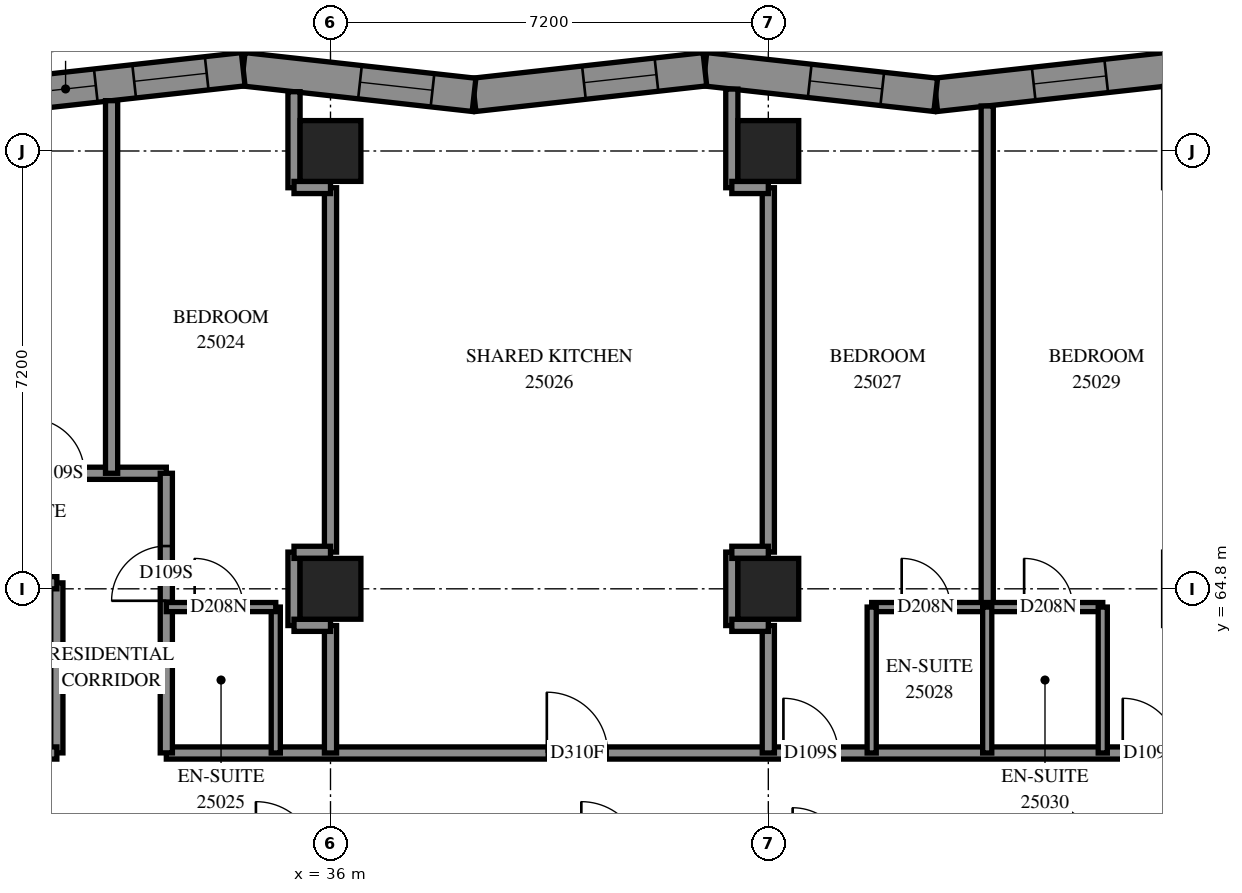
"""IFC4 building model, lengths in metres.
Left out: names, types, materials, properties, quantities, classifications, styles, units other than length and angle.
Written with IfcOpenShell. Run it as: python <this file> out.ifc"""

import sys

from ifc_helpers import new_model, si_unit, direction, frame, frame_2d, origin, origin_2d, place, context, subcontext, project, spatial, polyline, rectangle, outline, extrude, element, fill, save


model = new_model("IFC4")
c1 = context("Model", 3, precision=1e-05, world=origin(), true_north=direction((0.0, 1.0)))
c2 = subcontext(c1, "Body", "Model", "MODEL_VIEW")
j1 = project(units=[si_unit("LENGTHUNIT", "METRE"), si_unit("PLANEANGLEUNIT", "RADIAN")], contexts=[c1])
p1 = place(None, origin())
s1 = spatial("IfcSite", under=j1, at=p1, CompositionType="ELEMENT")
p2 = place(p1, origin())
s2 = spatial("IfcBuilding", under=s1, at=p2, CompositionType="ELEMENT")
p3 = place(p2, frame((0.0, 0.0, 94.8)))
s3 = spatial("IfcBuildingStorey", under=s2, at=p3, CompositionType="ELEMENT", Elevation=94.8)
for number, where, z_axis, x_axis in (
    (1, (36.0, 64.8, 0.0), (0.0, 0.0, 1.0), (1.0, 0.0, 0.0)),
    (2, (36.0, 72.0, 0.0), (0.0, 0.0, 1.0), (1.0, 0.0, 0.0)),
    (3, (43.2, 64.8, 0.0), (0.0, 0.0, 1.0), (1.0, 0.0, 0.0)),
    (4, (43.2, 72.0, 0.0), (0.0, 0.0, 1.0), (1.0, 0.0, 0.0)),
):
    element("IfcColumn", number, at=place(p3, frame(where, z_axis=z_axis, x_axis=x_axis)), inside=s3, PredefinedType="COLUMN", context=c2, shape_type="SweptSolid", body=[
        extrude(rectangle(XDim=1.0, YDim=1.0, at=origin_2d()), origin(), (0.0, 0.0, 1.0), 3.1),
    ])
p4 = place(p3, frame((49.749, 73.344, 0.0), z_axis=(0.0, 0.0, 1.0), x_axis=(-0.99390702, -0.1102217568, 0.0)))
e5 = element("IfcWall", 5, at=p4, inside=s3, PredefinedType="SOLIDWALL", context=c2, shape_type="SweptSolid", body=[
    extrude(outline(polyline([(-0.03, -0.275), (3.789, -0.275), (3.85, 0.275), (0.03, 0.275), (-0.03, -0.275)])), origin(), (0.0, 0.0, 1.0), 3.1),
])
p5 = place(p4, frame((0.999, 0.0, 0.5)))
e6 = element("IfcOpeningElement", 6, at=p5, cuts=e5, PredefinedType="OPENING", context=c2, shape_type="SweptSolid", body=[
    extrude(rectangle(XDim=1.2, YDim=2.45, at=frame_2d((0.6, 1.225))), frame((0.0, 0.285, 0.0), z_axis=(0.0, -1.0, 0.0), x_axis=(1.0, 0.0, 0.0)), (0.0, 0.0, 1.0), 0.57),
])
p6 = place(p3, frame((45.953, 72.923, 0.0), z_axis=(0.0, 0.0, 1.0), x_axis=(-0.99390702, 0.1102217568, 0.0)))
e7 = element("IfcWall", 7, at=p6, inside=s3, PredefinedType="SOLIDWALL", context=c2, shape_type="SweptSolid", body=[
    extrude(outline(polyline([(0.03, -0.275), (3.85, -0.275), (3.789, 0.275), (-0.03, 0.275), (0.03, -0.275)])), origin(), (0.0, 0.0, 1.0), 3.1),
])
p7 = place(p6, frame((0.885, 0.0, 0.5)))
e8 = element("IfcOpeningElement", 8, at=p7, cuts=e7, PredefinedType="OPENING", context=c2, shape_type="SweptSolid", body=[
    extrude(rectangle(XDim=1.2, YDim=2.45, at=frame_2d((0.6, 1.225))), frame((0.0, 0.285, 0.0), z_axis=(0.0, -1.0, 0.0), x_axis=(1.0, 0.0, 0.0)), (0.0, 0.0, 1.0), 0.57),
])
p8 = place(p3, frame((42.157, 73.344, 0.0), z_axis=(0.0, 0.0, 1.0), x_axis=(-0.99390702, -0.1102217568, 0.0)))
e9 = element("IfcWall", 9, at=p8, inside=s3, PredefinedType="SOLIDWALL", context=c2, shape_type="SweptSolid", body=[
    extrude(outline(polyline([(-0.03, -0.275), (3.789, -0.275), (3.85, 0.275), (0.03, 0.275), (-0.03, -0.275)])), origin(), (0.0, 0.0, 1.0), 3.1),
])
p9 = place(p8, frame((0.801, 0.0, 0.5)))
e10 = element("IfcOpeningElement", 10, at=p9, cuts=e9, PredefinedType="OPENING", context=c2, shape_type="SweptSolid", body=[
    extrude(rectangle(XDim=1.2, YDim=2.45, at=frame_2d((0.6, 1.225))), frame((0.0, 0.285, 0.0), z_axis=(0.0, -1.0, 0.0), x_axis=(1.0, 0.0, 0.0)), (0.0, 0.0, 1.0), 0.57),
])
p10 = place(p3, frame((38.361, 72.923, 0.0), z_axis=(0.0, 0.0, 1.0), x_axis=(-0.99390702, 0.1102217568, 0.0)))
e11 = element("IfcWall", 11, at=p10, inside=s3, PredefinedType="SOLIDWALL", context=c2, shape_type="SweptSolid", body=[
    extrude(outline(polyline([(0.03, -0.275), (3.85, -0.275), (3.789, 0.275), (-0.03, 0.275), (0.03, -0.275)])), origin(), (0.0, 0.0, 1.0), 3.1),
])
p11 = place(p10, frame((0.688, 0.0, 0.5)))
e12 = element("IfcOpeningElement", 12, at=p11, cuts=e11, PredefinedType="OPENING", context=c2, shape_type="SweptSolid", body=[
    extrude(rectangle(XDim=1.2, YDim=2.45, at=frame_2d((0.6, 1.225))), frame((0.0, 0.285, 0.0), z_axis=(0.0, -1.0, 0.0), x_axis=(1.0, 0.0, 0.0)), (0.0, 0.0, 1.0), 0.57),
])
p12 = place(p3, frame((34.564, 73.344, 0.0), z_axis=(0.0, 0.0, 1.0), x_axis=(-0.993907338, -0.1102188888, 0.0)))
e13 = element("IfcWall", 13, at=p12, inside=s3, PredefinedType="SOLIDWALL", context=c2, shape_type="SweptSolid", body=[
    extrude(outline(polyline([(-0.03, -0.275), (3.789, -0.275), (3.85, 0.275), (0.03, 0.275), (-0.03, -0.275)])), origin(), (0.0, 0.0, 1.0), 3.1),
])
p13 = place(p12, frame((0.604, 0.0, 0.5)))
e14 = element("IfcOpeningElement", 14, at=p13, cuts=e13, PredefinedType="OPENING", context=c2, shape_type="SweptSolid", body=[
    extrude(rectangle(XDim=1.2, YDim=2.45, at=frame_2d((0.6, 1.225))), frame((0.0, 0.285, 0.0), z_axis=(0.0, -1.0, 0.0), x_axis=(1.0, 0.0, 0.0)), (0.0, 0.0, 1.0), 0.57),
])
p14 = place(p12, frame((2.439, 0.0, 0.45)))
e15 = element("IfcOpeningElement", 15, at=p14, cuts=e13, PredefinedType="OPENING", context=c2, shape_type="SweptSolid", body=[
    extrude(rectangle(XDim=1.0, YDim=2.5, at=frame_2d((0.5, 1.25))), frame((0.0, 0.285, 0.0), z_axis=(0.0, -1.0, 0.0), x_axis=(1.0, 0.0, 0.0)), (0.0, 0.0, 1.0), 0.57),
])
p15 = place(p3, frame((33.3, 62.1, 0.0), z_axis=(0.0, 0.0, 1.0), x_axis=(1.0, 0.0, 0.0)))
e16 = element("IfcWall", 16, at=p15, inside=s3, PredefinedType="PARTITIONING", context=c2, shape_type="SweptSolid", body=[
    extrude(rectangle(XDim=17.1, YDim=0.2, at=frame_2d((8.55, 0.0))), origin(), (0.0, 0.0, 1.0), 3.1),
])
p16 = place(p15, frame((6.258, 0.0, 0.0)))
e17 = element("IfcOpeningElement", 17, at=p16, cuts=e16, PredefinedType="OPENING", context=c2, shape_type="SweptSolid", body=[
    extrude(rectangle(XDim=1.0, YDim=2.1, at=frame_2d((0.5, 1.05))), frame((0.0, 0.11, 0.0), z_axis=(0.0, -1.0, 0.0), x_axis=(1.0, 0.0, 0.0)), (0.0, 0.0, 1.0), 0.22),
])
p17 = place(p15, frame((10.148, 0.0, 0.0)))
e18 = element("IfcOpeningElement", 18, at=p17, cuts=e16, PredefinedType="OPENING", context=c2, shape_type="SweptSolid", body=[
    extrude(rectangle(XDim=0.9, YDim=2.1, at=frame_2d((0.45, 1.05))), frame((0.0, 0.11, 0.0), z_axis=(0.0, -1.0, 0.0), x_axis=(1.0, 0.0, 0.0)), (0.0, 0.0, 1.0), 0.22),
])
p18 = place(p15, frame((15.729, 0.0, 0.0)))
e19 = element("IfcOpeningElement", 19, at=p18, cuts=e16, PredefinedType="OPENING", context=c2, shape_type="SweptSolid", body=[
    extrude(rectangle(XDim=0.9, YDim=2.1, at=frame_2d((0.45, 1.05))), frame((0.0, 0.11, 0.0), z_axis=(0.0, -1.0, 0.0), x_axis=(1.0, 0.0, 0.0)), (0.0, 0.0, 1.0), 0.22),
])
p19 = place(p3, frame((21.602, 66.7, 0.0), z_axis=(0.0, 0.0, 1.0), x_axis=(1.0, 0.0, 0.0)))
e20 = element("IfcWall", 20, at=p19, inside=s3, PredefinedType="PARTITIONING", context=c2, shape_type="SweptSolid", body=[
    extrude(rectangle(XDim=11.698, YDim=0.2, at=frame_2d((5.849, 0.0))), origin(), (0.0, 0.0, 1.0), 3.1),
])
p20 = place(p19, frame((1.79, 0.0, 0.0)))
e21 = element("IfcOpeningElement", 21, at=p20, cuts=e20, PredefinedType="OPENING", context=c2, shape_type="SweptSolid", body=[
    extrude(rectangle(XDim=1.0, YDim=2.1, at=frame_2d((0.5, 1.05))), frame((0.0, 0.11, 0.0), z_axis=(0.0, -1.0, 0.0), x_axis=(1.0, 0.0, 0.0)), (0.0, 0.0, 1.0), 0.22),
])
p21 = place(p19, frame((3.998, 0.0, 0.0)))
e22 = element("IfcOpeningElement", 22, at=p21, cuts=e20, PredefinedType="OPENING", context=c2, shape_type="SweptSolid", body=[
    extrude(rectangle(XDim=0.9, YDim=2.1, at=frame_2d((0.45, 1.05))), frame((0.0, 0.11, 0.0), z_axis=(0.0, -1.0, 0.0), x_axis=(1.0, 0.0, 0.0)), (0.0, 0.0, 1.0), 0.22),
])
p22 = place(p19, frame((9.448, 0.0, 0.0)))
e23 = element("IfcOpeningElement", 23, at=p22, cuts=e20, PredefinedType="OPENING", context=c2, shape_type="SweptSolid", body=[
    extrude(rectangle(XDim=0.9, YDim=2.1, at=frame_2d((0.45, 1.05))), frame((0.0, 0.11, 0.0), z_axis=(0.0, -1.0, 0.0), x_axis=(1.0, 0.0, 0.0)), (0.0, 0.0, 1.0), 0.22),
])
p23 = place(p3, frame((46.8, 64.5, 0.0), z_axis=(0.0, 0.0, 1.0), x_axis=(0.0, 1.0, 0.0)))
e24 = element("IfcWall", 24, at=p23, inside=s3, PredefinedType="PARTITIONING", context=c2, shape_type="SweptSolid", body=[
    extrude(rectangle(XDim=8.241, YDim=0.2, at=frame_2d((4.12, 0.0))), origin(), (0.0, 0.0, 1.0), 3.1),
])
p24 = place(p3, frame((32.4, 66.7, 0.0), z_axis=(0.0, 0.0, 1.0), x_axis=(0.0, 1.0, 0.0)))
e25 = element("IfcWall", 25, at=p24, inside=s3, PredefinedType="PARTITIONING", context=c2, shape_type="SweptSolid", body=[
    extrude(rectangle(XDim=6.128, YDim=0.2, at=frame_2d((3.064, 0.0))), origin(), (0.0, 0.0, 1.0), 3.1),
])
for number, where, z_axis, x_axis in (
    (26, (36.0, 65.404, 0.0), (0.0, 0.0, 1.0), (0.0, 1.0, 0.0)),
    (27, (43.2, 65.404, 0.0), (0.0, 0.0, 1.0), (0.0, 1.0, 0.0)),
):
    element("IfcWall", number, at=place(p3, frame(where, z_axis=z_axis, x_axis=x_axis)), inside=s3, PredefinedType="PARTITIONING", context=c2, shape_type="SweptSolid", body=[
        extrude(rectangle(XDim=5.992, YDim=0.2, at=frame_2d((2.996, 0.0))), origin(), (0.0, 0.0, 1.0), 3.1),
    ])
p25 = place(p3, frame((33.3, 62.102, 0.0), z_axis=(0.0, 0.0, 1.0), x_axis=(0.0, 1.0, 0.0)))
e28 = element("IfcWall", 28, at=p25, inside=s3, PredefinedType="PARTITIONING", context=c2, shape_type="SweptSolid", body=[
    extrude(rectangle(XDim=4.598, YDim=0.2, at=frame_2d((2.299, 0.0))), origin(), (0.0, 0.0, 1.0), 3.1),
])
p26 = place(p25, frame((2.501, 0.0, 0.0)))
e29 = element("IfcOpeningElement", 29, at=p26, cuts=e28, PredefinedType="OPENING", context=c2, shape_type="SweptSolid", body=[
    extrude(rectangle(XDim=0.9, YDim=2.1, at=frame_2d((0.45, 1.05))), frame((0.0, 0.11, 0.0), z_axis=(0.0, -1.0, 0.0), x_axis=(1.0, 0.0, 0.0)), (0.0, 0.0, 1.0), 0.22),
])
p27 = place(p3, frame((44.9, 64.5, 0.0), z_axis=(0.0, 0.0, 1.0), x_axis=(1.0, 0.0, 0.0)))
e30 = element("IfcWall", 30, at=p27, inside=s3, PredefinedType="PARTITIONING", context=c2, shape_type="SweptSolid", body=[
    extrude(rectangle(XDim=3.8, YDim=0.15, at=frame_2d((1.9, 0.0))), origin(), (0.0, 0.0, 1.0), 3.1),
])
p28 = place(p27, frame((0.493, 0.0, 0.0)))
e31 = element("IfcOpeningElement", 31, at=p28, cuts=e30, PredefinedType="OPENING", context=c2, shape_type="SweptSolid", body=[
    extrude(rectangle(XDim=0.8, YDim=2.1, at=frame_2d((0.4, 1.05))), frame((0.0, 0.085, 0.0), z_axis=(0.0, -1.0, 0.0), x_axis=(1.0, 0.0, 0.0)), (0.0, 0.0, 1.0), 0.17),
])
p29 = place(p27, frame((2.507, 0.0, 0.0)))
e32 = element("IfcOpeningElement", 32, at=p29, cuts=e30, PredefinedType="OPENING", context=c2, shape_type="SweptSolid", body=[
    extrude(rectangle(XDim=0.8, YDim=2.1, at=frame_2d((0.4, 1.05))), frame((0.0, 0.085, 0.0), z_axis=(0.0, -1.0, 0.0), x_axis=(1.0, 0.0, 0.0)), (0.0, 0.0, 1.0), 0.17),
])
p30 = place(p3, frame((31.5, 62.102, 0.0), z_axis=(0.0, 0.0, 1.0), x_axis=(0.0, 1.0, 0.0)))
e33 = element("IfcWall", 33, at=p30, inside=s3, PredefinedType="PARTITIONING", context=c2, shape_type="SweptSolid", body=[
    extrude(rectangle(XDim=2.796, YDim=0.2, at=frame_2d((1.398, 0.0))), origin(), (0.0, 0.0, 1.0), 3.1),
])
p31 = place(p3, frame((28.802, 62.1, 0.0), z_axis=(0.0, 0.0, 1.0), x_axis=(1.0, 0.0, 0.0)))
e34 = element("IfcWall", 34, at=p31, inside=s3, PredefinedType="PARTITIONING", context=c2, shape_type="SweptSolid", body=[
    extrude(rectangle(XDim=2.698, YDim=0.2, at=frame_2d((1.349, 0.0))), origin(), (0.0, 0.0, 1.0), 3.1),
])
for number, where, z_axis, x_axis in (
    (35, (35.1, 62.1, 0.0), (0.0, 0.0, 1.0), (0.0, 1.0, 0.0)),
    (36, (44.9, 62.1, 0.0), (0.0, 0.0, 1.0), (0.0, 1.0, 0.0)),
    (37, (46.8, 62.1, 0.0), (0.0, 0.0, 1.0), (0.0, 1.0, 0.0)),
    (38, (48.7, 62.1, 0.0), (0.0, 0.0, 1.0), (0.0, 1.0, 0.0)),
):
    element("IfcWall", number, at=place(p3, frame(where, z_axis=z_axis, x_axis=x_axis)), inside=s3, PredefinedType="PARTITIONING", context=c2, shape_type="SweptSolid", body=[
        extrude(rectangle(XDim=2.4, YDim=0.15, at=frame_2d((1.2, 0.0))), origin(), (0.0, 0.0, 1.0), 3.1),
    ])
p32 = place(p3, frame((29.3, 64.9, 0.0), z_axis=(0.0, 0.0, 1.0), x_axis=(1.0, 0.0, 0.0)))
e39 = element("IfcWall", 39, at=p32, inside=s3, PredefinedType="PARTITIONING", context=c2, shape_type="SweptSolid", body=[
    extrude(rectangle(XDim=2.2, YDim=0.2, at=frame_2d((1.1, 0.0))), origin(), (0.0, 0.0, 1.0), 3.1),
])
p33 = place(p32, frame((0.31, 0.0, 0.0)))
e40 = element("IfcOpeningElement", 40, at=p33, cuts=e39, PredefinedType="OPENING", context=c2, shape_type="SweptSolid", body=[
    extrude(rectangle(XDim=1.0, YDim=2.1, at=frame_2d((0.5, 1.05))), frame((0.0, 0.11, 0.0), z_axis=(0.0, -1.0, 0.0), x_axis=(1.0, 0.0, 0.0)), (0.0, 0.0, 1.0), 0.22),
])
for number, where, z_axis, x_axis in (
    (41, (36.0, 62.1, 0.0), (0.0, 0.0, 1.0), (0.0, 1.0, 0.0)),
    (42, (43.2, 62.1, 0.0), (0.0, 0.0, 1.0), (0.0, 1.0, 0.0)),
):
    element("IfcWall", number, at=place(p3, frame(where, z_axis=z_axis, x_axis=x_axis)), inside=s3, PredefinedType="PARTITIONING", context=c2, shape_type="SweptSolid", body=[
        extrude(rectangle(XDim=2.096, YDim=0.2, at=frame_2d((1.048, 0.0))), origin(), (0.0, 0.0, 1.0), 3.1),
    ])
p34 = place(p3, frame((33.3, 64.5, 0.0), z_axis=(0.0, 0.0, 1.0), x_axis=(1.0, 0.0, 0.0)))
e43 = element("IfcWall", 43, at=p34, inside=s3, PredefinedType="PARTITIONING", context=c2, shape_type="SweptSolid", body=[
    extrude(rectangle(XDim=1.8, YDim=0.15, at=frame_2d((0.9, 0.0))), origin(), (0.0, 0.0, 1.0), 3.1),
])
p35 = place(p34, frame((0.466, 0.0, 0.0)))
e44 = element("IfcOpeningElement", 44, at=p35, cuts=e43, PredefinedType="OPENING", context=c2, shape_type="SweptSolid", body=[
    extrude(rectangle(XDim=0.8, YDim=2.1, at=frame_2d((0.4, 1.05))), frame((0.0, 0.085, 0.0), z_axis=(0.0, -1.0, 0.0), x_axis=(1.0, 0.0, 0.0)), (0.0, 0.0, 1.0), 0.17),
])
p36 = place(p3, frame((42.6, 71.396, 0.0), z_axis=(0.0, 0.0, 1.0), x_axis=(0.0, 1.0, 0.0)))
e45 = element("IfcWall", 45, at=p36, inside=s3, PredefinedType="PARTITIONING", context=c2, shape_type="SweptSolid", body=[
    extrude(rectangle(XDim=1.623, YDim=0.2, at=frame_2d((0.811, 0.0))), origin(), (0.0, 0.0, 1.0), 3.1),
])
p37 = place(p3, frame((35.4, 71.396, 0.0), z_axis=(0.0, 0.0, 1.0), x_axis=(0.0, 1.0, 0.0)))
e46 = element("IfcWall", 46, at=p37, inside=s3, PredefinedType="PARTITIONING", context=c2, shape_type="SweptSolid", body=[
    extrude(rectangle(XDim=1.579, YDim=0.2, at=frame_2d((0.789, 0.0))), origin(), (0.0, 0.0, 1.0), 3.1),
])
for number, where, z_axis, x_axis in (
    (47, (35.4, 64.196, 0.0), (0.0, 0.0, 1.0), (0.0, 1.0, 0.0)),
    (48, (42.6, 64.196, 0.0), (0.0, 0.0, 1.0), (0.0, 1.0, 0.0)),
):
    element("IfcWall", number, at=place(p3, frame(where, z_axis=z_axis, x_axis=x_axis)), inside=s3, PredefinedType="PARTITIONING", context=c2, shape_type="SweptSolid", body=[
        extrude(rectangle(XDim=1.208, YDim=0.2, at=frame_2d((0.604, 0.0))), origin(), (0.0, 0.0, 1.0), 3.1),
    ])
for number, where, z_axis, x_axis in (
    (49, (35.4, 71.4, 0.0), (0.0, 0.0, 1.0), (1.0, 0.0, 0.0)),
    (50, (42.6, 71.4, 0.0), (0.0, 0.0, 1.0), (1.0, 0.0, 0.0)),
    (51, (35.4, 65.4, 0.0), (0.0, 0.0, 1.0), (1.0, 0.0, 0.0)),
    (52, (42.6, 65.4, 0.0), (0.0, 0.0, 1.0), (1.0, 0.0, 0.0)),
    (53, (35.4, 64.2, 0.0), (0.0, 0.0, 1.0), (1.0, 0.0, 0.0)),
    (54, (42.6, 64.2, 0.0), (0.0, 0.0, 1.0), (1.0, 0.0, 0.0)),
):
    element("IfcWall", number, at=place(p3, frame(where, z_axis=z_axis, x_axis=x_axis)), inside=s3, PredefinedType="PARTITIONING", context=c2, shape_type="SweptSolid", body=[
        extrude(rectangle(XDim=0.6, YDim=0.2, at=frame_2d((0.3, 0.0))), origin(), (0.0, 0.0, 1.0), 3.1),
    ])
p38 = place(p5, origin())
e55 = element("IfcWindow", 55, at=p38, inside=s3, PartitioningType="SINGLE_PANEL", PredefinedType="WINDOW", context=c2, shape_type="SweptSolid", body=[
    extrude(rectangle(XDim=1.2, YDim=2.45, at=frame_2d((0.6, 1.225))), frame((0.0, 0.155, 0.0), z_axis=(0.0, -1.0, 0.0), x_axis=(1.0, 0.0, 0.0)), (0.0, 0.0, 1.0), 0.06),
])
fill(e6, e55)
p39 = place(p7, origin())
e56 = element("IfcWindow", 56, at=p39, inside=s3, PartitioningType="SINGLE_PANEL", PredefinedType="WINDOW", context=c2, shape_type="SweptSolid", body=[
    extrude(rectangle(XDim=1.2, YDim=2.45, at=frame_2d((0.6, 1.225))), frame((0.0, 0.155, 0.0), z_axis=(0.0, -1.0, 0.0), x_axis=(1.0, 0.0, 0.0)), (0.0, 0.0, 1.0), 0.06),
])
fill(e8, e56)
p40 = place(p9, origin())
e57 = element("IfcWindow", 57, at=p40, inside=s3, PartitioningType="SINGLE_PANEL", PredefinedType="WINDOW", context=c2, shape_type="SweptSolid", body=[
    extrude(rectangle(XDim=1.2, YDim=2.45, at=frame_2d((0.6, 1.225))), frame((0.0, 0.155, 0.0), z_axis=(0.0, -1.0, 0.0), x_axis=(1.0, 0.0, 0.0)), (0.0, 0.0, 1.0), 0.06),
])
fill(e10, e57)
p41 = place(p11, origin())
e58 = element("IfcWindow", 58, at=p41, inside=s3, PartitioningType="SINGLE_PANEL", PredefinedType="WINDOW", context=c2, shape_type="SweptSolid", body=[
    extrude(rectangle(XDim=1.2, YDim=2.45, at=frame_2d((0.6, 1.225))), frame((0.0, 0.155, 0.0), z_axis=(0.0, -1.0, 0.0), x_axis=(1.0, 0.0, 0.0)), (0.0, 0.0, 1.0), 0.06),
])
fill(e12, e58)
p42 = place(p13, origin())
e59 = element("IfcWindow", 59, at=p42, inside=s3, PartitioningType="SINGLE_PANEL", PredefinedType="WINDOW", context=c2, shape_type="SweptSolid", body=[
    extrude(rectangle(XDim=1.2, YDim=2.45, at=frame_2d((0.6, 1.225))), frame((0.0, 0.155, 0.0), z_axis=(0.0, -1.0, 0.0), x_axis=(1.0, 0.0, 0.0)), (0.0, 0.0, 1.0), 0.06),
])
fill(e14, e59)
p43 = place(p22, origin())
e60 = element("IfcDoor", 60, at=p43, inside=s3, OperationType="SINGLE_SWING_RIGHT", PredefinedType="DOOR", context=c2, shape_type="SweptSolid", body=[
    extrude(rectangle(XDim=0.9, YDim=2.1, at=frame_2d((0.45, 1.05))), frame((0.0, 0.025, 0.0), z_axis=(0.0, -1.0, 0.0), x_axis=(1.0, 0.0, 0.0)), (0.0, 0.0, 1.0), 0.05),
])
fill(e23, e60)
p44 = place(p26, origin())
e61 = element("IfcDoor", 61, at=p44, inside=s3, OperationType="SINGLE_SWING_LEFT", PredefinedType="DOOR", context=c2, shape_type="SweptSolid", body=[
    extrude(rectangle(XDim=0.9, YDim=2.1, at=frame_2d((0.45, 1.05))), frame((0.0, 0.025, 0.0), z_axis=(0.0, -1.0, 0.0), x_axis=(1.0, 0.0, 0.0)), (0.0, 0.0, 1.0), 0.05),
])
fill(e29, e61)
p45 = place(p35, origin())
e62 = element("IfcDoor", 62, at=p45, inside=s3, OperationType="SINGLE_SWING_RIGHT", PredefinedType="DOOR", context=c2, shape_type="SweptSolid", body=[
    extrude(rectangle(XDim=0.8, YDim=2.1, at=frame_2d((0.4, 1.05))), frame((0.0, 0.025, 0.0), z_axis=(0.0, -1.0, 0.0), x_axis=(1.0, 0.0, 0.0)), (0.0, 0.0, 1.0), 0.05),
])
fill(e44, e62)
p46 = place(p16, origin())
e63 = element("IfcDoor", 63, at=p46, inside=s3, OperationType="SINGLE_SWING_RIGHT", PredefinedType="DOOR", context=c2, shape_type="SweptSolid", body=[
    extrude(rectangle(XDim=1.0, YDim=2.1, at=frame_2d((0.5, 1.05))), frame((0.0, 0.025, 0.0), z_axis=(0.0, -1.0, 0.0), x_axis=(1.0, 0.0, 0.0)), (0.0, 0.0, 1.0), 0.05),
])
fill(e17, e63)
p47 = place(p17, origin())
e64 = element("IfcDoor", 64, at=p47, inside=s3, OperationType="SINGLE_SWING_RIGHT", PredefinedType="DOOR", context=c2, shape_type="SweptSolid", body=[
    extrude(rectangle(XDim=0.9, YDim=2.1, at=frame_2d((0.45, 1.05))), frame((0.0, 0.025, 0.0), z_axis=(0.0, -1.0, 0.0), x_axis=(1.0, 0.0, 0.0)), (0.0, 0.0, 1.0), 0.05),
])
fill(e18, e64)
p48 = place(p28, origin())
e65 = element("IfcDoor", 65, at=p48, inside=s3, OperationType="SINGLE_SWING_RIGHT", PredefinedType="DOOR", context=c2, shape_type="SweptSolid", body=[
    extrude(rectangle(XDim=0.8, YDim=2.1, at=frame_2d((0.4, 1.05))), frame((0.0, 0.025, 0.0), z_axis=(0.0, -1.0, 0.0), x_axis=(1.0, 0.0, 0.0)), (0.0, 0.0, 1.0), 0.05),
])
fill(e31, e65)
p49 = place(p18, origin())
e66 = element("IfcDoor", 66, at=p49, inside=s3, OperationType="SINGLE_SWING_LEFT", PredefinedType="DOOR", context=c2, shape_type="SweptSolid", body=[
    extrude(rectangle(XDim=0.9, YDim=2.1, at=frame_2d((0.45, 1.05))), frame((0.0, 0.025, 0.0), z_axis=(0.0, -1.0, 0.0), x_axis=(1.0, 0.0, 0.0)), (0.0, 0.0, 1.0), 0.05),
])
fill(e19, e66)
p50 = place(p29, origin())
e67 = element("IfcDoor", 67, at=p50, inside=s3, OperationType="SINGLE_SWING_RIGHT", PredefinedType="DOOR", context=c2, shape_type="SweptSolid", body=[
    extrude(rectangle(XDim=0.8, YDim=2.1, at=frame_2d((0.4, 1.05))), frame((0.0, 0.025, 0.0), z_axis=(0.0, -1.0, 0.0), x_axis=(1.0, 0.0, 0.0)), (0.0, 0.0, 1.0), 0.05),
])
fill(e32, e67)
p51 = place(p14, origin())
e68 = element("IfcWindow", 68, at=p51, inside=s3, PartitioningType="SINGLE_PANEL", PredefinedType="WINDOW", context=c2, shape_type="SweptSolid", body=[
    extrude(rectangle(XDim=1.0, YDim=2.5, at=frame_2d((0.5, 1.25))), frame((0.0, 0.155, 0.0), z_axis=(0.0, -1.0, 0.0), x_axis=(1.0, 0.0, 0.0)), (0.0, 0.0, 1.0), 0.06),
])
fill(e15, e68)
save(model, sys.argv[1])
